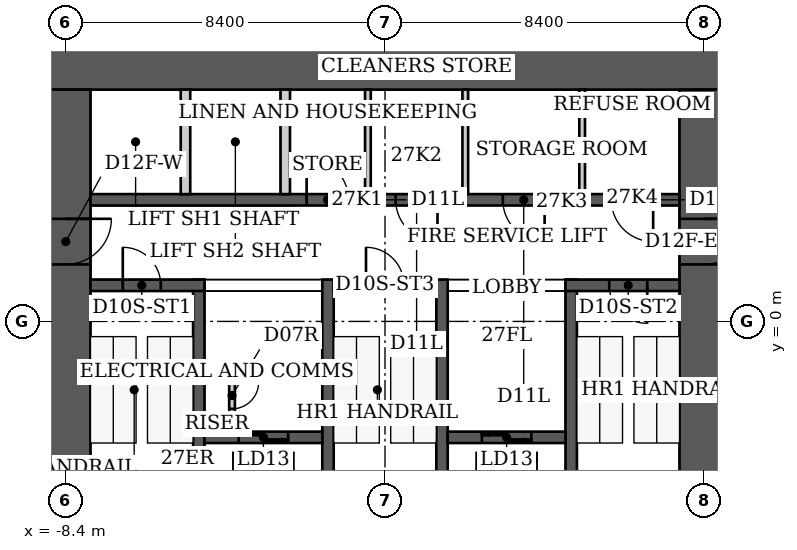
"""IFC4 building model, lengths in metres.
Left out: names, types, materials, properties, quantities, classifications, styles, units other than length and angle.
Written with IfcOpenShell. Run it as: python <this file> out.ifc"""

import sys

from ifc_helpers import new_model, si_unit, direction, frame, frame_2d, origin, place, context, subcontext, project, spatial, rectangle, extrude, element, fill, save


model = new_model("IFC4")
c1 = context("Model", 3, precision=1e-05, world=origin(), true_north=direction((0.0, 1.0)))
c2 = subcontext(c1, "Body", "Model", "MODEL_VIEW")
j1 = project(units=[si_unit("LENGTHUNIT", "METRE"), si_unit("PLANEANGLEUNIT", "RADIAN")], contexts=[c1])
p1 = place(None, origin())
s1 = spatial("IfcSite", under=j1, at=p1, CompositionType="ELEMENT")
p2 = place(p1, origin())
s2 = spatial("IfcBuilding", under=s1, at=p2, CompositionType="ELEMENT")
p3 = place(p2, frame((0.0, 0.0, 112.0)))
s3 = spatial("IfcBuildingStorey", under=s2, at=p3, CompositionType="ELEMENT", Elevation=112.0)
p4 = place(p3, frame((-9.05, 6.75, 0.0), z_axis=(0.0, 0.0, 1.0), x_axis=(1.0, 0.0, 0.0)))
e1 = element("IfcWall", 1, at=p4, inside=s3, PredefinedType="SHEAR", context=c2, shape_type="SweptSolid", body=[
    extrude(rectangle(XDim=18.1, YDim=1.3, at=frame_2d((9.05, 0.0))), origin(), (0.0, 0.0, 1.0), 3.8),
])
p5 = place(p3, frame((-8.4, -9.2, 0.0), z_axis=(0.0, 0.0, 1.0), x_axis=(0.0, 1.0, 0.0)))
e2 = element("IfcWall", 2, at=p5, inside=s3, PredefinedType="SHEAR", context=c2, shape_type="SweptSolid", body=[
    extrude(rectangle(XDim=15.3, YDim=1.3, at=frame_2d((7.65, 0.0))), origin(), (0.0, 0.0, 1.0), 3.8),
])
p6 = place(p5, frame((10.7, 0.0, 0.0)))
e3 = element("IfcOpeningElement", 3, at=p6, cuts=e2, PredefinedType="OPENING", context=c2, shape_type="SweptSolid", body=[
    extrude(rectangle(XDim=1.2, YDim=2.2, at=frame_2d((0.6, 1.1))), frame((0.0, 0.65, 0.0), z_axis=(0.0, -1.0, 0.0), x_axis=(1.0, 0.0, 0.0)), (0.0, 0.0, 1.0), 1.3),
])
p7 = place(p3, frame((8.4, -9.2, 0.0), z_axis=(0.0, 0.0, 1.0), x_axis=(0.0, 1.0, 0.0)))
e4 = element("IfcWall", 4, at=p7, inside=s3, PredefinedType="SHEAR", context=c2, shape_type="SweptSolid", body=[
    extrude(rectangle(XDim=15.3, YDim=1.3, at=frame_2d((7.65, 0.0))), origin(), (0.0, 0.0, 1.0), 3.8),
])
p8 = place(p7, frame((10.7, 0.0, 0.0)))
e5 = element("IfcOpeningElement", 5, at=p8, cuts=e4, PredefinedType="OPENING", context=c2, shape_type="SweptSolid", body=[
    extrude(rectangle(XDim=1.2, YDim=2.2, at=frame_2d((0.6, 1.1))), frame((0.0, 0.65, 0.0), z_axis=(0.0, -1.0, 0.0), x_axis=(1.0, 0.0, 0.0)), (0.0, 0.0, 1.0), 1.3),
])
for number, where, z_axis, x_axis in (
    (6, (-4.9, -6.1, 0.0), (0.0, 0.0, 1.0), (0.0, 1.0, 0.0)),
    (7, (-1.5, -6.1, 0.0), (0.0, 0.0, 1.0), (0.0, 1.0, 0.0)),
    (8, (1.5, -6.1, 0.0), (0.0, 0.0, 1.0), (0.0, 1.0, 0.0)),
    (9, (4.9, -6.1, 0.0), (0.0, 0.0, 1.0), (0.0, 1.0, 0.0)),
):
    element("IfcWall", number, at=place(p3, frame(where, z_axis=z_axis, x_axis=x_axis)), inside=s3, PredefinedType="SHEAR", context=c2, shape_type="SweptSolid", body=[
        extrude(rectangle(XDim=7.2, YDim=0.3, at=frame_2d((3.6, 0.0))), origin(), (0.0, 0.0, 1.0), 3.8),
    ])
p9 = place(p3, frame((-7.75, 0.95, 0.0), z_axis=(0.0, 0.0, 1.0), x_axis=(1.0, 0.0, 0.0)))
e10 = element("IfcWall", 10, at=p9, inside=s3, PredefinedType="SHEAR", context=c2, shape_type="SweptSolid", body=[
    extrude(rectangle(XDim=3.0, YDim=0.3, at=frame_2d((1.5, 0.0))), origin(), (0.0, 0.0, 1.0), 3.8),
])
p10 = place(p9, frame((0.85, 0.0, 0.0)))
e11 = element("IfcOpeningElement", 11, at=p10, cuts=e10, PredefinedType="OPENING", context=c2, shape_type="SweptSolid", body=[
    extrude(rectangle(XDim=1.0, YDim=2.2, at=frame_2d((0.5, 1.1))), frame((0.0, 0.15, 0.0), z_axis=(0.0, -1.0, 0.0), x_axis=(1.0, 0.0, 0.0)), (0.0, 0.0, 1.0), 0.3),
])
p11 = place(p3, frame((-1.35, 0.95, 0.0), z_axis=(0.0, 0.0, 1.0), x_axis=(1.0, 0.0, 0.0)))
e12 = element("IfcWall", 12, at=p11, inside=s3, PredefinedType="SHEAR", context=c2, shape_type="SweptSolid", body=[
    extrude(rectangle(XDim=2.7, YDim=0.3, at=frame_2d((1.35, 0.0))), origin(), (0.0, 0.0, 1.0), 3.8),
])
p12 = place(p11, frame((0.85, 0.0, 0.0)))
e13 = element("IfcOpeningElement", 13, at=p12, cuts=e12, PredefinedType="OPENING", context=c2, shape_type="SweptSolid", body=[
    extrude(rectangle(XDim=1.0, YDim=2.2, at=frame_2d((0.5, 1.1))), frame((0.0, 0.15, 0.0), z_axis=(0.0, -1.0, 0.0), x_axis=(1.0, 0.0, 0.0)), (0.0, 0.0, 1.0), 0.3),
])
p13 = place(p3, frame((4.75, 0.95, 0.0), z_axis=(0.0, 0.0, 1.0), x_axis=(1.0, 0.0, 0.0)))
e14 = element("IfcWall", 14, at=p13, inside=s3, PredefinedType="SHEAR", context=c2, shape_type="SweptSolid", body=[
    extrude(rectangle(XDim=3.0, YDim=0.3, at=frame_2d((1.5, 0.0))), origin(), (0.0, 0.0, 1.0), 3.8),
])
p14 = place(p13, frame((1.15, 0.0, 0.0)))
e15 = element("IfcOpeningElement", 15, at=p14, cuts=e14, PredefinedType="OPENING", context=c2, shape_type="SweptSolid", body=[
    extrude(rectangle(XDim=1.0, YDim=2.2, at=frame_2d((0.5, 1.1))), frame((0.0, 0.15, 0.0), z_axis=(0.0, -1.0, 0.0), x_axis=(1.0, 0.0, 0.0)), (0.0, 0.0, 1.0), 0.3),
])
p15 = place(p3, frame((-4.75, -3.05, 0.0), z_axis=(0.0, 0.0, 1.0), x_axis=(1.0, 0.0, 0.0)))
e16 = element("IfcWall", 16, at=p15, inside=s3, PredefinedType="SHEAR", context=c2, shape_type="SweptSolid", body=[
    extrude(rectangle(XDim=3.1, YDim=0.3, at=frame_2d((1.55, 0.0))), origin(), (0.0, 0.0, 1.0), 3.8),
])
p16 = place(p15, frame((0.9, 0.0, 0.0)))
e17 = element("IfcOpeningElement", 17, at=p16, cuts=e16, PredefinedType="OPENING", context=c2, shape_type="SweptSolid", body=[
    extrude(rectangle(XDim=1.3, YDim=2.1, at=frame_2d((0.65, 1.05))), frame((0.0, 0.15, 0.0), z_axis=(0.0, -1.0, 0.0), x_axis=(1.0, 0.0, 0.0)), (0.0, 0.0, 1.0), 0.3),
])
p17 = place(p3, frame((1.65, -3.05, 0.0), z_axis=(0.0, 0.0, 1.0), x_axis=(1.0, 0.0, 0.0)))
e18 = element("IfcWall", 18, at=p17, inside=s3, PredefinedType="SHEAR", context=c2, shape_type="SweptSolid", body=[
    extrude(rectangle(XDim=3.1, YDim=0.3, at=frame_2d((1.55, 0.0))), origin(), (0.0, 0.0, 1.0), 3.8),
])
p18 = place(p17, frame((0.9, 0.0, 0.0)))
e19 = element("IfcOpeningElement", 19, at=p18, cuts=e18, PredefinedType="OPENING", context=c2, shape_type="SweptSolid", body=[
    extrude(rectangle(XDim=1.3, YDim=2.1, at=frame_2d((0.65, 1.05))), frame((0.0, 0.15, 0.0), z_axis=(0.0, -1.0, 0.0), x_axis=(1.0, 0.0, 0.0)), (0.0, 0.0, 1.0), 0.3),
])
p19 = place(p3, frame((-7.75, 3.2, 0.0), z_axis=(0.0, 0.0, 1.0), x_axis=(1.0, 0.0, 0.0)))
e20 = element("IfcWall", 20, at=p19, inside=s3, PredefinedType="SHEAR", context=c2, shape_type="SweptSolid", body=[
    extrude(rectangle(XDim=15.5, YDim=0.3, at=frame_2d((7.75, 0.0))), origin(), (0.0, 0.0, 1.0), 3.8),
])
p20 = place(p19, frame((5.688, 0.0, 0.0)))
e21 = element("IfcOpeningElement", 21, at=p20, cuts=e20, PredefinedType="OPENING", context=c2, shape_type="SweptSolid", body=[
    extrude(rectangle(XDim=1.1, YDim=2.2, at=frame_2d((0.55, 1.1))), frame((0.0, 0.15, 0.0), z_axis=(0.0, -1.0, 0.0), x_axis=(1.0, 0.0, 0.0)), (0.0, 0.0, 1.0), 0.3),
])
p21 = place(p19, frame((8.031, 0.0, 0.0)))
e22 = element("IfcOpeningElement", 22, at=p21, cuts=e20, PredefinedType="OPENING", context=c2, shape_type="SweptSolid", body=[
    extrude(rectangle(XDim=1.1, YDim=2.2, at=frame_2d((0.55, 1.1))), frame((0.0, 0.15, 0.0), z_axis=(0.0, -1.0, 0.0), x_axis=(1.0, 0.0, 0.0)), (0.0, 0.0, 1.0), 0.3),
])
p22 = place(p19, frame((10.85, 0.0, 0.0)))
e23 = element("IfcOpeningElement", 23, at=p22, cuts=e20, PredefinedType="OPENING", context=c2, shape_type="SweptSolid", body=[
    extrude(rectangle(XDim=1.1, YDim=2.2, at=frame_2d((0.55, 1.1))), frame((0.0, 0.15, 0.0), z_axis=(0.0, -1.0, 0.0), x_axis=(1.0, 0.0, 0.0)), (0.0, 0.0, 1.0), 0.3),
])
p23 = place(p19, frame((13.706, 0.0, 0.0)))
e24 = element("IfcOpeningElement", 24, at=p23, cuts=e20, PredefinedType="OPENING", context=c2, shape_type="SweptSolid", body=[
    extrude(rectangle(XDim=1.1, YDim=2.2, at=frame_2d((0.55, 1.1))), frame((0.0, 0.15, 0.0), z_axis=(0.0, -1.0, 0.0), x_axis=(1.0, 0.0, 0.0)), (0.0, 0.0, 1.0), 0.3),
])
for number, where, z_axis, x_axis in (
    (25, (-5.25, 3.35, 0.0), (0.0, 0.0, 1.0), (0.0, 1.0, 0.0)),
    (26, (-2.625, 3.35, 0.0), (0.0, 0.0, 1.0), (0.0, 1.0, 0.0)),
):
    element("IfcWall", number, at=place(p3, frame(where, z_axis=z_axis, x_axis=x_axis)), inside=s3, PredefinedType="PARTITIONING", context=c2, shape_type="SweptSolid", body=[
        extrude(rectangle(XDim=2.75, YDim=0.25, at=frame_2d((1.375, 0.0))), origin(), (0.0, 0.0, 1.0), 3.8),
    ])
p24 = place(p3, frame((-4.025, -2.9, 0.0), z_axis=(0.0, 0.0, 1.0), x_axis=(0.0, 1.0, 0.0)))
e27 = element("IfcWall", 27, at=p24, inside=s3, PredefinedType="PARTITIONING", context=c2, shape_type="SweptSolid", body=[
    extrude(rectangle(XDim=1.775, YDim=0.15, at=frame_2d((0.887, 0.0))), origin(), (0.0, 0.0, 1.0), 3.64),
])
p25 = place(p24, frame((0.6, 0.0, 0.0)))
e28 = element("IfcOpeningElement", 28, at=p25, cuts=e27, PredefinedType="OPENING", context=c2, shape_type="SweptSolid", body=[
    extrude(rectangle(XDim=0.7, YDim=2.1, at=frame_2d((0.35, 1.05))), frame((0.0, 0.075, 0.0), z_axis=(0.0, -1.0, 0.0), x_axis=(1.0, 0.0, 0.0)), (0.0, 0.0, 1.0), 0.15),
])
p26 = place(p3, frame((-4.75, -1.2, 0.0), z_axis=(0.0, 0.0, 1.0), x_axis=(1.0, 0.0, 0.0)))
e29 = element("IfcWall", 29, at=p26, inside=s3, PredefinedType="PARTITIONING", context=c2, shape_type="SweptSolid", body=[
    extrude(rectangle(XDim=0.8, YDim=0.15, at=frame_2d((0.4, 0.0))), origin(), (0.0, 0.0, 1.0), 3.64),
])
for number, where, z_axis, x_axis in (
    (30, (-0.45, 3.35, 0.0), (0.0, 0.0, 1.0), (0.0, 1.0, 0.0)),
    (31, (2.113, 3.35, 0.0), (0.0, 0.0, 1.0), (0.0, 1.0, 0.0)),
    (32, (5.188, 3.35, 0.0), (0.0, 0.0, 1.0), (0.0, 1.0, 0.0)),
):
    element("IfcWall", number, at=place(p3, frame(where, z_axis=z_axis, x_axis=x_axis)), inside=s3, PredefinedType="PARTITIONING", context=c2, shape_type="SweptSolid", body=[
        extrude(rectangle(XDim=2.75, YDim=0.15, at=frame_2d((1.375, 0.0))), origin(), (0.0, 0.0, 1.0), 3.64),
    ])
p27 = place(p10, origin())
e33 = element("IfcDoor", 33, at=p27, inside=s3, OperationType="SINGLE_SWING_LEFT", PredefinedType="DOOR", context=c2, shape_type="SweptSolid", body=[
    extrude(rectangle(XDim=1.0, YDim=2.2, at=frame_2d((0.5, 1.1))), frame((0.0, 0.025, 0.0), z_axis=(0.0, -1.0, 0.0), x_axis=(1.0, 0.0, 0.0)), (0.0, 0.0, 1.0), 0.05),
])
fill(e11, e33)
p28 = place(p12, origin())
e34 = element("IfcDoor", 34, at=p28, inside=s3, OperationType="SINGLE_SWING_LEFT", PredefinedType="DOOR", context=c2, shape_type="SweptSolid", body=[
    extrude(rectangle(XDim=1.0, YDim=2.2, at=frame_2d((0.5, 1.1))), frame((0.0, 0.025, 0.0), z_axis=(0.0, -1.0, 0.0), x_axis=(1.0, 0.0, 0.0)), (0.0, 0.0, 1.0), 0.05),
])
fill(e13, e34)
p29 = place(p14, origin())
e35 = element("IfcDoor", 35, at=p29, inside=s3, OperationType="SINGLE_SWING_RIGHT", PredefinedType="DOOR", context=c2, shape_type="SweptSolid", body=[
    extrude(rectangle(XDim=1.0, YDim=2.2, at=frame_2d((0.5, 1.1))), frame((0.0, 0.025, 0.0), z_axis=(0.0, -1.0, 0.0), x_axis=(1.0, 0.0, 0.0)), (0.0, 0.0, 1.0), 0.05),
])
fill(e15, e35)
p30 = place(p6, origin())
e36 = element("IfcDoor", 36, at=p30, inside=s3, OperationType="SINGLE_SWING_RIGHT", PredefinedType="DOOR", context=c2, shape_type="SweptSolid", body=[
    extrude(rectangle(XDim=1.2, YDim=2.2, at=frame_2d((0.6, 1.1))), frame((0.0, 0.025, 0.0), z_axis=(0.0, -1.0, 0.0), x_axis=(1.0, 0.0, 0.0)), (0.0, 0.0, 1.0), 0.05),
])
fill(e3, e36)
p31 = place(p8, origin())
e37 = element("IfcDoor", 37, at=p31, inside=s3, OperationType="SINGLE_SWING_RIGHT", PredefinedType="DOOR", context=c2, shape_type="SweptSolid", body=[
    extrude(rectangle(XDim=1.2, YDim=2.2, at=frame_2d((0.6, 1.1))), frame((0.0, 0.025, 0.0), z_axis=(0.0, -1.0, 0.0), x_axis=(1.0, 0.0, 0.0)), (0.0, 0.0, 1.0), 0.05),
])
fill(e5, e37)
p32 = place(p25, origin())
e38 = element("IfcDoor", 38, at=p32, inside=s3, OperationType="SINGLE_SWING_RIGHT", PredefinedType="DOOR", context=c2, shape_type="SweptSolid", body=[
    extrude(rectangle(XDim=0.7, YDim=2.1, at=frame_2d((0.35, 1.05))), frame((0.0, 0.025, 0.0), z_axis=(0.0, -1.0, 0.0), x_axis=(1.0, 0.0, 0.0)), (0.0, 0.0, 1.0), 0.05),
])
fill(e28, e38)
p33 = place(p20, origin())
e39 = element("IfcDoor", 39, at=p33, inside=s3, OperationType="SINGLE_SWING_LEFT", PredefinedType="DOOR", context=c2, shape_type="SweptSolid", body=[
    extrude(rectangle(XDim=1.1, YDim=2.2, at=frame_2d((0.55, 1.1))), frame((0.0, 0.025, 0.0), z_axis=(0.0, -1.0, 0.0), x_axis=(1.0, 0.0, 0.0)), (0.0, 0.0, 1.0), 0.05),
])
fill(e21, e39)
p34 = place(p21, origin())
e40 = element("IfcDoor", 40, at=p34, inside=s3, OperationType="SINGLE_SWING_RIGHT", PredefinedType="DOOR", context=c2, shape_type="SweptSolid", body=[
    extrude(rectangle(XDim=1.1, YDim=2.2, at=frame_2d((0.55, 1.1))), frame((0.0, 0.025, 0.0), z_axis=(0.0, -1.0, 0.0), x_axis=(1.0, 0.0, 0.0)), (0.0, 0.0, 1.0), 0.05),
])
fill(e22, e40)
p35 = place(p22, origin())
e41 = element("IfcDoor", 41, at=p35, inside=s3, OperationType="SINGLE_SWING_RIGHT", PredefinedType="DOOR", context=c2, shape_type="SweptSolid", body=[
    extrude(rectangle(XDim=1.1, YDim=2.2, at=frame_2d((0.55, 1.1))), frame((0.0, 0.025, 0.0), z_axis=(0.0, -1.0, 0.0), x_axis=(1.0, 0.0, 0.0)), (0.0, 0.0, 1.0), 0.05),
])
fill(e23, e41)
p36 = place(p23, origin())
e42 = element("IfcDoor", 42, at=p36, inside=s3, OperationType="SINGLE_SWING_RIGHT", PredefinedType="DOOR", context=c2, shape_type="SweptSolid", body=[
    extrude(rectangle(XDim=1.1, YDim=2.2, at=frame_2d((0.55, 1.1))), frame((0.0, 0.025, 0.0), z_axis=(0.0, -1.0, 0.0), x_axis=(1.0, 0.0, 0.0)), (0.0, 0.0, 1.0), 0.05),
])
fill(e24, e42)
p37 = place(p16, origin())
e43 = element("IfcDoor", 43, at=p37, inside=s3, OperationType="DOUBLE_DOOR_SLIDING", PredefinedType="DOOR", context=c2, shape_type="SweptSolid", body=[
    extrude(rectangle(XDim=1.3, YDim=2.1, at=frame_2d((0.65, 1.05))), frame((0.0, 0.025, 0.0), z_axis=(0.0, -1.0, 0.0), x_axis=(1.0, 0.0, 0.0)), (0.0, 0.0, 1.0), 0.05),
])
fill(e17, e43)
p38 = place(p18, origin())
e44 = element("IfcDoor", 44, at=p38, inside=s3, OperationType="DOUBLE_DOOR_SLIDING", PredefinedType="DOOR", context=c2, shape_type="SweptSolid", body=[
    extrude(rectangle(XDim=1.3, YDim=2.1, at=frame_2d((0.65, 1.05))), frame((0.0, 0.025, 0.0), z_axis=(0.0, -1.0, 0.0), x_axis=(1.0, 0.0, 0.0)), (0.0, 0.0, 1.0), 0.05),
])
fill(e19, e44)
save(model, sys.argv[1])
